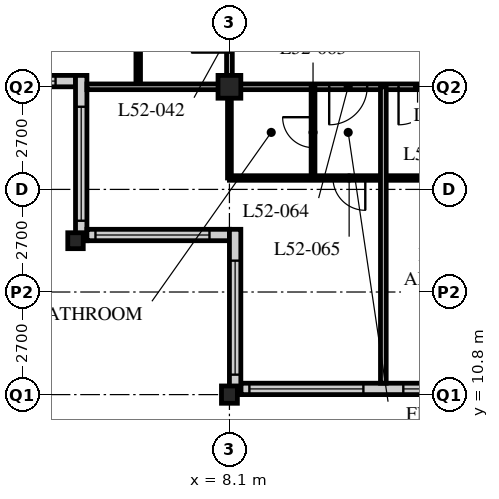
"""IFC4 building model, lengths in metres.
Left out: names, types, materials, properties, quantities, classifications, styles, units other than length and angle.
Written with IfcOpenShell. Run it as: python <this file> out.ifc"""

import sys

from ifc_helpers import new_model, si_unit, direction, frame, frame_2d, origin, origin_2d, place, context, subcontext, project, spatial, rectangle, hollow_rectangle, i_section, extrude, element, fill, save


model = new_model("IFC4")
c1 = context("Model", 3, precision=1e-05, world=origin(), true_north=direction((0.0, 1.0)))
c2 = subcontext(c1, "Body", "Model", "MODEL_VIEW")
j1 = project(units=[si_unit("LENGTHUNIT", "METRE"), si_unit("PLANEANGLEUNIT", "RADIAN")], contexts=[c1])
p1 = place(None, origin())
s1 = spatial("IfcSite", under=j1, at=p1, CompositionType="ELEMENT")
p2 = place(p1, origin())
s2 = spatial("IfcBuilding", under=s1, at=p2, CompositionType="ELEMENT")
p3 = place(p2, frame((0.0, 0.0, 202.8)))
s3 = spatial("IfcBuildingStorey", under=s2, at=p3, CompositionType="ELEMENT", Elevation=202.8)
p4 = place(p3, frame((4.05, 14.85, 0.0), z_axis=(0.0, 0.0, 1.0), x_axis=(1.0, 0.0, 0.0)))
e1 = element("IfcColumn", 1, at=p4, inside=s3, PredefinedType="COLUMN", context=c2, shape_type="SweptSolid", body=[
    extrude(i_section(OverallWidth=0.407, OverallDepth=0.419, WebThickness=0.031, FlangeThickness=0.049, FilletRadius=0.015, at=origin_2d()), origin(), (0.0, 0.0, 1.0), 3.6),
])
p5 = place(p3, frame((8.1, 10.8, 0.0), z_axis=(0.0, 0.0, 1.0), x_axis=(1.0, 0.0, 0.0)))
e2 = element("IfcColumn", 2, at=p5, inside=s3, PredefinedType="COLUMN", context=c2, shape_type="SweptSolid", body=[
    extrude(i_section(OverallWidth=0.418, OverallDepth=0.456, WebThickness=0.042, FlangeThickness=0.067, FilletRadius=0.015, at=origin_2d()), origin(), (0.0, 0.0, 1.0), 3.6),
])
p6 = place(p3, frame((8.1, 18.9, 0.0), z_axis=(0.0, 0.0, 1.0), x_axis=(1.0, 0.0, 0.0)))
e3 = element("IfcColumn", 3, at=p6, inside=s3, PredefinedType="COLUMN", context=c2, shape_type="SweptSolid", body=[
    extrude(hollow_rectangle(XDim=0.6, YDim=0.6, WallThickness=0.05, at=origin_2d()), origin(), (0.0, 0.0, 1.0), 3.6),
])
p7 = place(p3, frame((8.4, 10.95, 0.0), z_axis=(0.0, 0.0, 1.0), x_axis=(1.0, 0.0, 0.0)))
e4 = element("IfcWall", 4, at=p7, inside=s3, PredefinedType="SOLIDWALL", context=c2, shape_type="SweptSolid", body=[
    extrude(rectangle(XDim=40.2, YDim=0.3, at=frame_2d((20.1, 0.0))), origin(), (0.0, 0.0, 1.0), 3.39),
])
p8 = place(p7, frame((0.225, 0.0, 0.6)))
e5 = element("IfcOpeningElement", 5, at=p8, cuts=e4, PredefinedType="OPENING", context=c2, shape_type="SweptSolid", body=[
    extrude(rectangle(XDim=3.0, YDim=2.4, at=frame_2d((1.5, 1.2))), frame((0.0, 0.16, 0.0), z_axis=(0.0, -1.0, 0.0), x_axis=(1.0, 0.0, 0.0)), (0.0, 0.0, 1.0), 0.32),
])
p9 = place(p7, frame((4.275, 0.0, 0.6)))
e6 = element("IfcOpeningElement", 6, at=p9, cuts=e4, PredefinedType="OPENING", context=c2, shape_type="SweptSolid", body=[
    extrude(rectangle(XDim=3.0, YDim=2.4, at=frame_2d((1.5, 1.2))), frame((0.0, 0.16, 0.0), z_axis=(0.0, -1.0, 0.0), x_axis=(1.0, 0.0, 0.0)), (0.0, 0.0, 1.0), 0.32),
])
p10 = place(p7, frame((8.325, 0.0, 0.6)))
e7 = element("IfcOpeningElement", 7, at=p10, cuts=e4, PredefinedType="OPENING", context=c2, shape_type="SweptSolid", body=[
    extrude(rectangle(XDim=3.0, YDim=2.4, at=frame_2d((1.5, 1.2))), frame((0.0, 0.16, 0.0), z_axis=(0.0, -1.0, 0.0), x_axis=(1.0, 0.0, 0.0)), (0.0, 0.0, 1.0), 0.32),
])
p11 = place(p7, frame((12.375, 0.0, 0.6)))
e8 = element("IfcOpeningElement", 8, at=p11, cuts=e4, PredefinedType="OPENING", context=c2, shape_type="SweptSolid", body=[
    extrude(rectangle(XDim=3.0, YDim=2.4, at=frame_2d((1.5, 1.2))), frame((0.0, 0.16, 0.0), z_axis=(0.0, -1.0, 0.0), x_axis=(1.0, 0.0, 0.0)), (0.0, 0.0, 1.0), 0.32),
])
p12 = place(p7, frame((16.425, 0.0, 0.6)))
e9 = element("IfcOpeningElement", 9, at=p12, cuts=e4, PredefinedType="OPENING", context=c2, shape_type="SweptSolid", body=[
    extrude(rectangle(XDim=3.0, YDim=2.4, at=frame_2d((1.5, 1.2))), frame((0.0, 0.16, 0.0), z_axis=(0.0, -1.0, 0.0), x_axis=(1.0, 0.0, 0.0)), (0.0, 0.0, 1.0), 0.32),
])
p13 = place(p7, frame((20.475, 0.0, 0.6)))
e10 = element("IfcOpeningElement", 10, at=p13, cuts=e4, PredefinedType="OPENING", context=c2, shape_type="SweptSolid", body=[
    extrude(rectangle(XDim=3.0, YDim=2.4, at=frame_2d((1.5, 1.2))), frame((0.0, 0.16, 0.0), z_axis=(0.0, -1.0, 0.0), x_axis=(1.0, 0.0, 0.0)), (0.0, 0.0, 1.0), 0.32),
])
p14 = place(p7, frame((24.525, 0.0, 0.6)))
e11 = element("IfcOpeningElement", 11, at=p14, cuts=e4, PredefinedType="OPENING", context=c2, shape_type="SweptSolid", body=[
    extrude(rectangle(XDim=3.0, YDim=2.4, at=frame_2d((1.5, 1.2))), frame((0.0, 0.16, 0.0), z_axis=(0.0, -1.0, 0.0), x_axis=(1.0, 0.0, 0.0)), (0.0, 0.0, 1.0), 0.32),
])
p15 = place(p7, frame((28.575, 0.0, 0.6)))
e12 = element("IfcOpeningElement", 12, at=p15, cuts=e4, PredefinedType="OPENING", context=c2, shape_type="SweptSolid", body=[
    extrude(rectangle(XDim=3.0, YDim=2.4, at=frame_2d((1.5, 1.2))), frame((0.0, 0.16, 0.0), z_axis=(0.0, -1.0, 0.0), x_axis=(1.0, 0.0, 0.0)), (0.0, 0.0, 1.0), 0.32),
])
p16 = place(p7, frame((32.625, 0.0, 0.6)))
e13 = element("IfcOpeningElement", 13, at=p16, cuts=e4, PredefinedType="OPENING", context=c2, shape_type="SweptSolid", body=[
    extrude(rectangle(XDim=3.0, YDim=2.4, at=frame_2d((1.5, 1.2))), frame((0.0, 0.16, 0.0), z_axis=(0.0, -1.0, 0.0), x_axis=(1.0, 0.0, 0.0)), (0.0, 0.0, 1.0), 0.32),
])
p17 = place(p7, frame((36.675, 0.0, 0.6)))
e14 = element("IfcOpeningElement", 14, at=p17, cuts=e4, PredefinedType="OPENING", context=c2, shape_type="SweptSolid", body=[
    extrude(rectangle(XDim=3.0, YDim=2.4, at=frame_2d((1.5, 1.2))), frame((0.0, 0.16, 0.0), z_axis=(0.0, -1.0, 0.0), x_axis=(1.0, 0.0, 0.0)), (0.0, 0.0, 1.0), 0.32),
])
p18 = place(p3, frame((0.3, 19.05, 0.0), z_axis=(0.0, 0.0, 1.0), x_axis=(1.0, 0.0, 0.0)))
e15 = element("IfcWall", 15, at=p18, inside=s3, PredefinedType="SOLIDWALL", context=c2, shape_type="SweptSolid", body=[
    extrude(rectangle(XDim=3.75, YDim=0.3, at=frame_2d((1.875, 0.0))), origin(), (0.0, 0.0, 1.0), 3.39),
])
p19 = place(p18, frame((0.225, 0.0, 0.6)))
e16 = element("IfcOpeningElement", 16, at=p19, cuts=e15, PredefinedType="OPENING", context=c2, shape_type="SweptSolid", body=[
    extrude(rectangle(XDim=3.0, YDim=2.0, at=frame_2d((1.5, 1.0))), frame((0.0, 0.16, 0.0), z_axis=(0.0, -1.0, 0.0), x_axis=(1.0, 0.0, 0.0)), (0.0, 0.0, 1.0), 0.32),
])
p20 = place(p3, frame((4.2, 19.2, 0.0), z_axis=(0.0, 0.0, 1.0), x_axis=(0.0, -1.0, 0.0)))
e17 = element("IfcWall", 17, at=p20, inside=s3, PredefinedType="SOLIDWALL", context=c2, shape_type="SweptSolid", body=[
    extrude(rectangle(XDim=4.35, YDim=0.3, at=frame_2d((2.175, 0.0))), origin(), (0.0, 0.0, 1.0), 3.39),
])
p21 = place(p20, frame((0.825, 0.0, 0.6)))
e18 = element("IfcOpeningElement", 18, at=p21, cuts=e17, PredefinedType="OPENING", context=c2, shape_type="SweptSolid", body=[
    extrude(rectangle(XDim=3.0, YDim=2.0, at=frame_2d((1.5, 1.0))), frame((0.0, 0.16, 0.0), z_axis=(0.0, -1.0, 0.0), x_axis=(1.0, 0.0, 0.0)), (0.0, 0.0, 1.0), 0.32),
])
p22 = place(p3, frame((4.35, 15.0, 0.0), z_axis=(0.0, 0.0, 1.0), x_axis=(1.0, 0.0, 0.0)))
e19 = element("IfcWall", 19, at=p22, inside=s3, PredefinedType="SOLIDWALL", context=c2, shape_type="SweptSolid", body=[
    extrude(rectangle(XDim=3.75, YDim=0.3, at=frame_2d((1.875, 0.0))), origin(), (0.0, 0.0, 1.0), 3.39),
])
p23 = place(p22, frame((0.225, 0.0, 0.6)))
e20 = element("IfcOpeningElement", 20, at=p23, cuts=e19, PredefinedType="OPENING", context=c2, shape_type="SweptSolid", body=[
    extrude(rectangle(XDim=3.0, YDim=2.0, at=frame_2d((1.5, 1.0))), frame((0.0, 0.16, 0.0), z_axis=(0.0, -1.0, 0.0), x_axis=(1.0, 0.0, 0.0)), (0.0, 0.0, 1.0), 0.32),
])
p24 = place(p3, frame((8.25, 15.15, 0.0), z_axis=(0.0, 0.0, 1.0), x_axis=(0.0, -1.0, 0.0)))
e21 = element("IfcWall", 21, at=p24, inside=s3, PredefinedType="SOLIDWALL", context=c2, shape_type="SweptSolid", body=[
    extrude(rectangle(XDim=4.35, YDim=0.3, at=frame_2d((2.175, 0.0))), origin(), (0.0, 0.0, 1.0), 3.39),
])
p25 = place(p24, frame((0.825, 0.0, 0.6)))
e22 = element("IfcOpeningElement", 22, at=p25, cuts=e21, PredefinedType="OPENING", context=c2, shape_type="SweptSolid", body=[
    extrude(rectangle(XDim=3.0, YDim=2.0, at=frame_2d((1.5, 1.0))), frame((0.0, 0.16, 0.0), z_axis=(0.0, -1.0, 0.0), x_axis=(1.0, 0.0, 0.0)), (0.0, 0.0, 1.0), 0.32),
])
p26 = place(p3, frame((8.1, 18.9, 0.0), z_axis=(0.0, 0.0, 1.0), x_axis=(1.0, 0.0, 0.0)))
e23 = element("IfcWall", 23, at=p26, inside=s3, PredefinedType="PARTITIONING", context=c2, shape_type="SweptSolid", body=[
    extrude(rectangle(XDim=36.45, YDim=0.15, at=frame_2d((18.225, 0.0))), origin(), (0.0, 0.0, 1.0), 2.778),
])
p27 = place(p26, frame((4.45, 0.0, 0.0)))
e24 = element("IfcOpeningElement", 24, at=p27, cuts=e23, PredefinedType="OPENING", context=c2, shape_type="SweptSolid", body=[
    extrude(rectangle(XDim=1.0, YDim=2.1, at=frame_2d((0.5, 1.05))), frame((0.0, 0.085, 0.0), z_axis=(0.0, -1.0, 0.0), x_axis=(1.0, 0.0, 0.0)), (0.0, 0.0, 1.0), 0.17),
])
p28 = place(p26, frame((12.55, 0.0, 0.0)))
e25 = element("IfcOpeningElement", 25, at=p28, cuts=e23, PredefinedType="OPENING", context=c2, shape_type="SweptSolid", body=[
    extrude(rectangle(XDim=1.0, YDim=2.1, at=frame_2d((0.5, 1.05))), frame((0.0, 0.085, 0.0), z_axis=(0.0, -1.0, 0.0), x_axis=(1.0, 0.0, 0.0)), (0.0, 0.0, 1.0), 0.17),
])
p29 = place(p26, frame((29.05, 0.0, 0.0)))
e26 = element("IfcOpeningElement", 26, at=p29, cuts=e23, PredefinedType="OPENING", context=c2, shape_type="SweptSolid", body=[
    extrude(rectangle(XDim=1.0, YDim=2.1, at=frame_2d((0.5, 1.05))), frame((0.0, 0.085, 0.0), z_axis=(0.0, -1.0, 0.0), x_axis=(1.0, 0.0, 0.0)), (0.0, 0.0, 1.0), 0.17),
])
p30 = place(p26, frame((2.625, 0.0, 0.0)))
e27 = element("IfcOpeningElement", 27, at=p30, cuts=e23, PredefinedType="OPENING", context=c2, shape_type="SweptSolid", body=[
    extrude(rectangle(XDim=1.0, YDim=2.1, at=frame_2d((0.5, 1.05))), frame((0.0, 0.085, 0.0), z_axis=(0.0, -1.0, 0.0), x_axis=(1.0, 0.0, 0.0)), (0.0, 0.0, 1.0), 0.17),
])
p31 = place(p26, frame((33.925, 0.0, 0.0)))
e28 = element("IfcOpeningElement", 28, at=p31, cuts=e23, PredefinedType="OPENING", context=c2, shape_type="SweptSolid", body=[
    extrude(rectangle(XDim=1.0, YDim=2.1, at=frame_2d((0.5, 1.05))), frame((0.0, 0.085, 0.0), z_axis=(0.0, -1.0, 0.0), x_axis=(1.0, 0.0, 0.0)), (0.0, 0.0, 1.0), 0.17),
])
p32 = place(p3, frame((8.1, 18.9, 0.0), z_axis=(0.0, 0.0, 1.0), x_axis=(0.0, 1.0, 0.0)))
e29 = element("IfcWall", 29, at=p32, inside=s3, PredefinedType="PARTITIONING", context=c2, shape_type="SweptSolid", body=[
    extrude(rectangle(XDim=28.35, YDim=0.15, at=frame_2d((14.175, 0.0))), origin(), (0.0, 0.0, 1.0), 2.778),
])
p33 = place(p32, frame((0.9, 0.0, 0.0)))
e30 = element("IfcOpeningElement", 30, at=p33, cuts=e29, PredefinedType="OPENING", context=c2, shape_type="SweptSolid", body=[
    extrude(rectangle(XDim=1.0, YDim=2.1, at=frame_2d((0.5, 1.05))), frame((0.0, 0.085, 0.0), z_axis=(0.0, -1.0, 0.0), x_axis=(1.0, 0.0, 0.0)), (0.0, 0.0, 1.0), 0.17),
])
p34 = place(p32, frame((17.1, 0.0, 0.0)))
e31 = element("IfcOpeningElement", 31, at=p34, cuts=e29, PredefinedType="OPENING", context=c2, shape_type="SweptSolid", body=[
    extrude(rectangle(XDim=1.0, YDim=2.1, at=frame_2d((0.5, 1.05))), frame((0.0, 0.085, 0.0), z_axis=(0.0, -1.0, 0.0), x_axis=(1.0, 0.0, 0.0)), (0.0, 0.0, 1.0), 0.17),
])
p35 = place(p32, frame((26.65, 0.0, 0.0)))
e32 = element("IfcOpeningElement", 32, at=p35, cuts=e29, PredefinedType="OPENING", context=c2, shape_type="SweptSolid", body=[
    extrude(rectangle(XDim=1.0, YDim=2.1, at=frame_2d((0.5, 1.05))), frame((0.0, 0.085, 0.0), z_axis=(0.0, -1.0, 0.0), x_axis=(1.0, 0.0, 0.0)), (0.0, 0.0, 1.0), 0.17),
])
p36 = place(p3, frame((5.7, 18.9, 0.0), z_axis=(0.0, 0.0, 1.0), x_axis=(0.0, 1.0, 0.0)))
e33 = element("IfcWall", 33, at=p36, inside=s3, PredefinedType="PARTITIONING", context=c2, shape_type="SweptSolid", body=[
    extrude(rectangle(XDim=24.3, YDim=0.12, at=frame_2d((12.15, 0.0))), origin(), (0.0, 0.0, 1.0), 3.39),
])
p37 = place(p36, frame((0.975, 0.0, 0.0)))
e34 = element("IfcOpeningElement", 34, at=p37, cuts=e33, PredefinedType="OPENING", context=c2, shape_type="SweptSolid", body=[
    extrude(rectangle(XDim=0.85, YDim=2.1, at=frame_2d((0.425, 1.05))), frame((0.0, 0.07, 0.0), z_axis=(0.0, -1.0, 0.0), x_axis=(1.0, 0.0, 0.0)), (0.0, 0.0, 1.0), 0.14),
])
p38 = place(p36, frame((8.425, 0.0, 0.0)))
e35 = element("IfcOpeningElement", 35, at=p38, cuts=e33, PredefinedType="OPENING", context=c2, shape_type="SweptSolid", body=[
    extrude(rectangle(XDim=0.85, YDim=2.1, at=frame_2d((0.425, 1.05))), frame((0.0, 0.07, 0.0), z_axis=(0.0, -1.0, 0.0), x_axis=(1.0, 0.0, 0.0)), (0.0, 0.0, 1.0), 0.14),
])
p39 = place(p36, frame((12.475, 0.0, 0.0)))
e36 = element("IfcOpeningElement", 36, at=p39, cuts=e33, PredefinedType="OPENING", context=c2, shape_type="SweptSolid", body=[
    extrude(rectangle(XDim=0.85, YDim=2.1, at=frame_2d((0.425, 1.05))), frame((0.0, 0.07, 0.0), z_axis=(0.0, -1.0, 0.0), x_axis=(1.0, 0.0, 0.0)), (0.0, 0.0, 1.0), 0.14),
])
p40 = place(p36, frame((17.175, 0.0, 0.0)))
e37 = element("IfcOpeningElement", 37, at=p40, cuts=e33, PredefinedType="OPENING", context=c2, shape_type="SweptSolid", body=[
    extrude(rectangle(XDim=0.85, YDim=2.1, at=frame_2d((0.425, 1.05))), frame((0.0, 0.07, 0.0), z_axis=(0.0, -1.0, 0.0), x_axis=(1.0, 0.0, 0.0)), (0.0, 0.0, 1.0), 0.14),
])
p41 = place(p36, frame((20.575, 0.0, 0.0)))
e38 = element("IfcOpeningElement", 38, at=p41, cuts=e33, PredefinedType="OPENING", context=c2, shape_type="SweptSolid", body=[
    extrude(rectangle(XDim=0.85, YDim=2.1, at=frame_2d((0.425, 1.05))), frame((0.0, 0.07, 0.0), z_axis=(0.0, -1.0, 0.0), x_axis=(1.0, 0.0, 0.0)), (0.0, 0.0, 1.0), 0.14),
])
p42 = place(p3, frame((8.1, 16.5, 0.0), z_axis=(0.0, 0.0, 1.0), x_axis=(1.0, 0.0, 0.0)))
e39 = element("IfcWall", 39, at=p42, inside=s3, PredefinedType="PARTITIONING", context=c2, shape_type="SweptSolid", body=[
    extrude(rectangle(XDim=28.35, YDim=0.12, at=frame_2d((14.175, 0.0))), origin(), (0.0, 0.0, 1.0), 3.39),
])
p43 = place(p42, frame((5.025, 0.0, 0.0)))
e40 = element("IfcOpeningElement", 40, at=p43, cuts=e39, PredefinedType="OPENING", context=c2, shape_type="SweptSolid", body=[
    extrude(rectangle(XDim=0.85, YDim=2.1, at=frame_2d((0.425, 1.05))), frame((0.0, 0.07, 0.0), z_axis=(0.0, -1.0, 0.0), x_axis=(1.0, 0.0, 0.0)), (0.0, 0.0, 1.0), 0.14),
])
p44 = place(p42, frame((8.425, 0.0, 0.0)))
e41 = element("IfcOpeningElement", 41, at=p44, cuts=e39, PredefinedType="OPENING", context=c2, shape_type="SweptSolid", body=[
    extrude(rectangle(XDim=0.85, YDim=2.1, at=frame_2d((0.425, 1.05))), frame((0.0, 0.07, 0.0), z_axis=(0.0, -1.0, 0.0), x_axis=(1.0, 0.0, 0.0)), (0.0, 0.0, 1.0), 0.14),
])
p45 = place(p42, frame((13.125, 0.0, 0.0)))
e42 = element("IfcOpeningElement", 42, at=p45, cuts=e39, PredefinedType="OPENING", context=c2, shape_type="SweptSolid", body=[
    extrude(rectangle(XDim=0.85, YDim=2.1, at=frame_2d((0.425, 1.05))), frame((0.0, 0.07, 0.0), z_axis=(0.0, -1.0, 0.0), x_axis=(1.0, 0.0, 0.0)), (0.0, 0.0, 1.0), 0.14),
])
p46 = place(p42, frame((20.575, 0.0, 0.0)))
e43 = element("IfcOpeningElement", 43, at=p46, cuts=e39, PredefinedType="OPENING", context=c2, shape_type="SweptSolid", body=[
    extrude(rectangle(XDim=0.85, YDim=2.1, at=frame_2d((0.425, 1.05))), frame((0.0, 0.07, 0.0), z_axis=(0.0, -1.0, 0.0), x_axis=(1.0, 0.0, 0.0)), (0.0, 0.0, 1.0), 0.14),
])
p47 = place(p42, frame((24.625, 0.0, 0.0)))
e44 = element("IfcOpeningElement", 44, at=p47, cuts=e39, PredefinedType="OPENING", context=c2, shape_type="SweptSolid", body=[
    extrude(rectangle(XDim=0.85, YDim=2.1, at=frame_2d((0.425, 1.05))), frame((0.0, 0.07, 0.0), z_axis=(0.0, -1.0, 0.0), x_axis=(1.0, 0.0, 0.0)), (0.0, 0.0, 1.0), 0.14),
])
p48 = place(p42, frame((2.725, 0.0, 0.0)))
e45 = element("IfcOpeningElement", 45, at=p48, cuts=e39, PredefinedType="OPENING", context=c2, shape_type="SweptSolid", body=[
    extrude(rectangle(XDim=0.85, YDim=2.1, at=frame_2d((0.425, 1.05))), frame((0.0, 0.07, 0.0), z_axis=(0.0, -1.0, 0.0), x_axis=(1.0, 0.0, 0.0)), (0.0, 0.0, 1.0), 0.14),
])
p49 = place(p3, frame((10.3, 18.9, 0.0), z_axis=(0.0, 0.0, 1.0), x_axis=(0.0, -1.0, 0.0)))
e46 = element("IfcWall", 46, at=p49, inside=s3, PredefinedType="PARTITIONING", context=c2, shape_type="SweptSolid", body=[
    extrude(rectangle(XDim=2.4, YDim=0.1, at=frame_2d((1.2, 0.0))), origin(), (0.0, 0.0, 1.0), 3.39),
])
p50 = place(p49, frame((0.8, 0.0, 0.0)))
e47 = element("IfcOpeningElement", 47, at=p50, cuts=e46, PredefinedType="OPENING", context=c2, shape_type="SweptSolid", body=[
    extrude(rectangle(XDim=0.8, YDim=2.1, at=frame_2d((0.4, 1.05))), frame((0.0, 0.06, 0.0), z_axis=(0.0, -1.0, 0.0), x_axis=(1.0, 0.0, 0.0)), (0.0, 0.0, 1.0), 0.12),
])
p51 = place(p3, frame((8.1, 18.9, 0.0), z_axis=(0.0, 0.0, 1.0), x_axis=(0.0, -1.0, 0.0)))
e48 = element("IfcWall", 48, at=p51, inside=s3, PredefinedType="PARTITIONING", context=c2, shape_type="SweptSolid", body=[
    extrude(rectangle(XDim=2.4, YDim=0.1, at=frame_2d((1.2, 0.0))), origin(), (0.0, 0.0, 1.0), 2.778),
])
p52 = place(p3, frame((4.35, 18.9, 0.0), z_axis=(0.0, 0.0, 1.0), x_axis=(1.0, 0.0, 0.0)))
e49 = element("IfcWall", 49, at=p52, inside=s3, PredefinedType="PARTITIONING", context=c2, shape_type="SweptSolid", body=[
    extrude(rectangle(XDim=3.75, YDim=0.15, at=frame_2d((1.875, 0.0))), origin(), (0.0, 0.0, 1.0), 2.778),
])
p53 = place(p3, frame((12.15, 18.9, 0.0), z_axis=(0.0, 0.0, 1.0), x_axis=(0.0, -1.0, 0.0)))
e50 = element("IfcWall", 50, at=p53, inside=s3, PredefinedType="PARTITIONING", context=c2, shape_type="SweptSolid", body=[
    extrude(rectangle(XDim=7.8, YDim=0.15, at=frame_2d((3.9, 0.0))), origin(), (0.0, 0.0, 1.0), 3.39),
])
p54 = place(p8, origin())
e51 = element("IfcWindow", 51, at=p54, inside=s3, PartitioningType="SINGLE_PANEL", PredefinedType="WINDOW", context=c2, shape_type="SweptSolid", body=[
    extrude(rectangle(XDim=3.0, YDim=2.4, at=frame_2d((1.5, 1.2))), frame((0.0, 0.03, 0.0), z_axis=(0.0, -1.0, 0.0), x_axis=(1.0, 0.0, 0.0)), (0.0, 0.0, 1.0), 0.06),
])
fill(e5, e51)
p55 = place(p9, origin())
e52 = element("IfcWindow", 52, at=p55, inside=s3, PartitioningType="SINGLE_PANEL", PredefinedType="WINDOW", context=c2, shape_type="SweptSolid", body=[
    extrude(rectangle(XDim=3.0, YDim=2.4, at=frame_2d((1.5, 1.2))), frame((0.0, 0.03, 0.0), z_axis=(0.0, -1.0, 0.0), x_axis=(1.0, 0.0, 0.0)), (0.0, 0.0, 1.0), 0.06),
])
fill(e6, e52)
p56 = place(p19, origin())
e53 = element("IfcWindow", 53, at=p56, inside=s3, PartitioningType="SINGLE_PANEL", PredefinedType="WINDOW", context=c2, shape_type="SweptSolid", body=[
    extrude(rectangle(XDim=3.0, YDim=2.0, at=frame_2d((1.5, 1.0))), frame((0.0, 0.03, 0.0), z_axis=(0.0, -1.0, 0.0), x_axis=(1.0, 0.0, 0.0)), (0.0, 0.0, 1.0), 0.06),
])
fill(e16, e53)
p57 = place(p21, origin())
e54 = element("IfcWindow", 54, at=p57, inside=s3, PartitioningType="SINGLE_PANEL", PredefinedType="WINDOW", context=c2, shape_type="SweptSolid", body=[
    extrude(rectangle(XDim=3.0, YDim=2.0, at=frame_2d((1.5, 1.0))), frame((0.0, 0.03, 0.0), z_axis=(0.0, -1.0, 0.0), x_axis=(1.0, 0.0, 0.0)), (0.0, 0.0, 1.0), 0.06),
])
fill(e18, e54)
p58 = place(p23, origin())
e55 = element("IfcWindow", 55, at=p58, inside=s3, PartitioningType="SINGLE_PANEL", PredefinedType="WINDOW", context=c2, shape_type="SweptSolid", body=[
    extrude(rectangle(XDim=3.0, YDim=2.0, at=frame_2d((1.5, 1.0))), frame((0.0, 0.03, 0.0), z_axis=(0.0, -1.0, 0.0), x_axis=(1.0, 0.0, 0.0)), (0.0, 0.0, 1.0), 0.06),
])
fill(e20, e55)
p59 = place(p25, origin())
e56 = element("IfcWindow", 56, at=p59, inside=s3, PartitioningType="SINGLE_PANEL", PredefinedType="WINDOW", context=c2, shape_type="SweptSolid", body=[
    extrude(rectangle(XDim=3.0, YDim=2.0, at=frame_2d((1.5, 1.0))), frame((0.0, 0.03, 0.0), z_axis=(0.0, -1.0, 0.0), x_axis=(1.0, 0.0, 0.0)), (0.0, 0.0, 1.0), 0.06),
])
fill(e22, e56)
p60 = place(p27, origin())
e57 = element("IfcDoor", 57, at=p60, inside=s3, OperationType="SINGLE_SWING_RIGHT", PredefinedType="DOOR", context=c2, shape_type="SweptSolid", body=[
    extrude(rectangle(XDim=1.0, YDim=2.1, at=frame_2d((0.5, 1.05))), frame((0.0, 0.025, 0.0), z_axis=(0.0, -1.0, 0.0), x_axis=(1.0, 0.0, 0.0)), (0.0, 0.0, 1.0), 0.05),
])
fill(e24, e57)
p61 = place(p33, origin())
e58 = element("IfcDoor", 58, at=p61, inside=s3, OperationType="SINGLE_SWING_LEFT", PredefinedType="DOOR", context=c2, shape_type="SweptSolid", body=[
    extrude(rectangle(XDim=1.0, YDim=2.1, at=frame_2d((0.5, 1.05))), frame((0.0, 0.025, 0.0), z_axis=(0.0, -1.0, 0.0), x_axis=(1.0, 0.0, 0.0)), (0.0, 0.0, 1.0), 0.05),
])
fill(e30, e58)
p62 = place(p50, origin())
e59 = element("IfcDoor", 59, at=p62, inside=s3, OperationType="SINGLE_SWING_RIGHT", PredefinedType="DOOR", context=c2, shape_type="SweptSolid", body=[
    extrude(rectangle(XDim=0.8, YDim=2.1, at=frame_2d((0.4, 1.05))), frame((0.0, 0.025, 0.0), z_axis=(0.0, -1.0, 0.0), x_axis=(1.0, 0.0, 0.0)), (0.0, 0.0, 1.0), 0.05),
])
fill(e47, e59)
p63 = place(p30, origin())
e60 = element("IfcDoor", 60, at=p63, inside=s3, OperationType="SINGLE_SWING_RIGHT", PredefinedType="DOOR", context=c2, shape_type="SweptSolid", body=[
    extrude(rectangle(XDim=1.0, YDim=2.1, at=frame_2d((0.5, 1.05))), frame((0.0, 0.025, 0.0), z_axis=(0.0, -1.0, 0.0), x_axis=(1.0, 0.0, 0.0)), (0.0, 0.0, 1.0), 0.05),
])
fill(e27, e60)
p64 = place(p48, origin())
e61 = element("IfcDoor", 61, at=p64, inside=s3, OperationType="SINGLE_SWING_LEFT", PredefinedType="DOOR", context=c2, shape_type="SweptSolid", body=[
    extrude(rectangle(XDim=0.85, YDim=2.1, at=frame_2d((0.425, 1.05))), frame((0.0, 0.025, 0.0), z_axis=(0.0, -1.0, 0.0), x_axis=(1.0, 0.0, 0.0)), (0.0, 0.0, 1.0), 0.05),
])
fill(e45, e61)
save(model, sys.argv[1])
